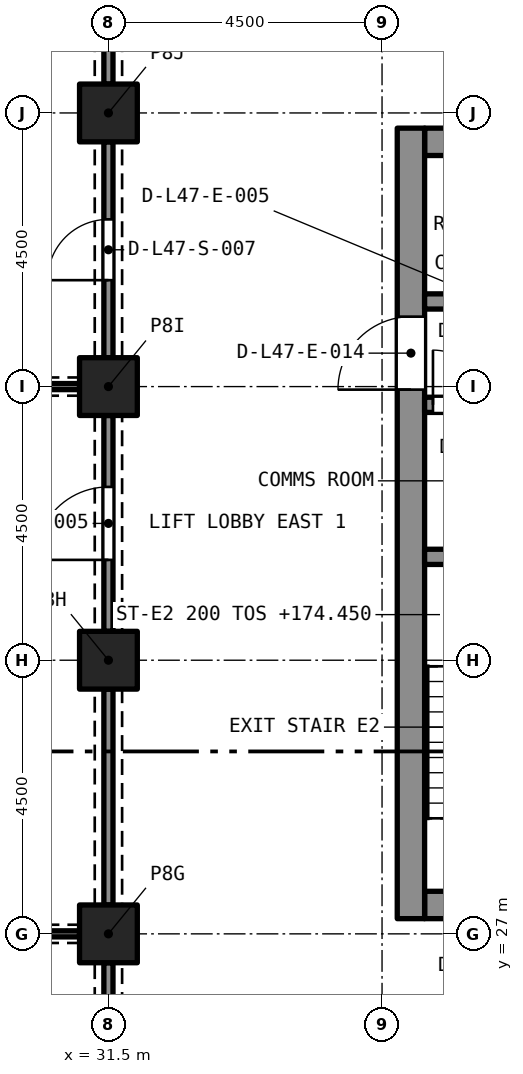
"""IFC4 building model, lengths in metres.
Left out: names, types, materials, properties, quantities, classifications, styles, units other than length and angle.
Written with IfcOpenShell. Run it as: python <this file> out.ifc"""

import sys

from ifc_helpers import new_model, si_unit, direction, frame, frame_2d, origin, origin_2d, place, context, subcontext, project, spatial, rectangle, extrude, element, fill, save


model = new_model("IFC4")
c1 = context("Model", 3, precision=1e-05, world=origin(), true_north=direction((0.0, 1.0)))
c2 = subcontext(c1, "Body", "Model", "MODEL_VIEW")
j1 = project(units=[si_unit("LENGTHUNIT", "METRE"), si_unit("PLANEANGLEUNIT", "RADIAN")], contexts=[c1])
p1 = place(None, origin())
s1 = spatial("IfcSite", under=j1, at=p1, CompositionType="ELEMENT")
p2 = place(p1, origin())
s2 = spatial("IfcBuilding", under=s1, at=p2, CompositionType="ELEMENT")
p3 = place(p2, frame((0.0, 0.0, 172.6)))
s3 = spatial("IfcBuildingStorey", under=s2, at=p3, CompositionType="ELEMENT", Elevation=172.6)
for number, where, z_axis, x_axis in (
    (1, (31.5, 27.0, 0.0), (0.0, 0.0, 1.0), (1.0, 0.0, 0.0)),
    (2, (31.5, 31.5, 0.0), (0.0, 0.0, 1.0), (1.0, 0.0, 0.0)),
    (3, (31.5, 36.0, 0.0), (0.0, 0.0, 1.0), (1.0, 0.0, 0.0)),
    (4, (31.5, 40.5, 0.0), (0.0, 0.0, 1.0), (1.0, 0.0, 0.0)),
):
    element("IfcColumn", number, at=place(p3, frame(where, z_axis=z_axis, x_axis=x_axis)), inside=s3, PredefinedType="COLUMN", context=c2, shape_type="SweptSolid", body=[
        extrude(rectangle(XDim=0.95, YDim=0.95, at=origin_2d()), origin(), (0.0, 0.0, 1.0), 3.7),
    ])
p4 = place(p3, frame((36.7, 27.475, 0.0), z_axis=(0.0, 0.0, 1.0), x_axis=(1.0, 0.0, 0.0)))
e5 = element("IfcWall", 5, at=p4, inside=s3, PredefinedType="SOLIDWALL", context=c2, shape_type="SweptSolid", body=[
    extrude(rectangle(XDim=7.6, YDim=0.45, at=frame_2d((3.8, 0.0))), origin(), (0.0, 0.0, 1.0), 3.7),
])
p5 = place(p4, frame((5.775, 0.0, 0.0)))
e6 = element("IfcOpeningElement", 6, at=p5, cuts=e5, PredefinedType="OPENING", context=c2, shape_type="SweptSolid", body=[
    extrude(rectangle(XDim=1.1, YDim=2.1, at=frame_2d((0.55, 1.05))), frame((0.0, 0.235, 0.0), z_axis=(0.0, -1.0, 0.0), x_axis=(1.0, 0.0, 0.0)), (0.0, 0.0, 1.0), 0.47),
])
p6 = place(p4, frame((3.25, 0.0, 0.0)))
e7 = element("IfcOpeningElement", 7, at=p6, cuts=e5, PredefinedType="OPENING", context=c2, shape_type="SweptSolid", body=[
    extrude(rectangle(XDim=1.1, YDim=2.1, at=frame_2d((0.55, 1.05))), frame((0.0, 0.235, 0.0), z_axis=(0.0, -1.0, 0.0), x_axis=(1.0, 0.0, 0.0)), (0.0, 0.0, 1.0), 0.47),
])
p7 = place(p4, frame((0.725, 0.0, 0.0)))
e8 = element("IfcOpeningElement", 8, at=p7, cuts=e5, PredefinedType="OPENING", context=c2, shape_type="SweptSolid", body=[
    extrude(rectangle(XDim=1.1, YDim=2.1, at=frame_2d((0.55, 1.05))), frame((0.0, 0.235, 0.0), z_axis=(0.0, -1.0, 0.0), x_axis=(1.0, 0.0, 0.0)), (0.0, 0.0, 1.0), 0.47),
])
p8 = place(p3, frame((36.7, 40.025, 0.0), z_axis=(0.0, 0.0, 1.0), x_axis=(1.0, 0.0, 0.0)))
e9 = element("IfcWall", 9, at=p8, inside=s3, PredefinedType="SOLIDWALL", context=c2, shape_type="SweptSolid", body=[
    extrude(rectangle(XDim=7.6, YDim=0.45, at=frame_2d((3.8, 0.0))), origin(), (0.0, 0.0, 1.0), 3.7),
])
p9 = place(p3, frame((36.475, 27.25, 0.0), z_axis=(0.0, 0.0, 1.0), x_axis=(0.0, 1.0, 0.0)))
e10 = element("IfcWall", 10, at=p9, inside=s3, PredefinedType="SOLIDWALL", context=c2, shape_type="SweptSolid", body=[
    extrude(rectangle(XDim=13.0, YDim=0.45, at=frame_2d((6.5, 0.0))), origin(), (0.0, 0.0, 1.0), 3.7),
])
p10 = place(p9, frame((8.7, 0.0, 0.0)))
e11 = element("IfcOpeningElement", 11, at=p10, cuts=e10, PredefinedType="OPENING", context=c2, shape_type="SweptSolid", body=[
    extrude(rectangle(XDim=1.2, YDim=2.1, at=frame_2d((0.6, 1.05))), frame((0.0, 0.235, 0.0), z_axis=(0.0, -1.0, 0.0), x_axis=(1.0, 0.0, 0.0)), (0.0, 0.0, 1.0), 0.47),
])
p11 = place(p3, frame((36.7, 33.2, 0.0), z_axis=(0.0, 0.0, 1.0), x_axis=(1.0, 0.0, 0.0)))
e12 = element("IfcWall", 12, at=p11, inside=s3, PredefinedType="SOLIDWALL", context=c2, shape_type="SweptSolid", body=[
    extrude(rectangle(XDim=7.6, YDim=0.25, at=frame_2d((3.8, 0.0))), origin(), (0.0, 0.0, 1.0), 3.4),
])
p12 = place(p11, frame((3.3, 0.0, 0.0)))
e13 = element("IfcOpeningElement", 13, at=p12, cuts=e12, PredefinedType="OPENING", context=c2, shape_type="SweptSolid", body=[
    extrude(rectangle(XDim=1.0, YDim=2.1, at=frame_2d((0.5, 1.05))), frame((0.0, 0.135, 0.0), z_axis=(0.0, -1.0, 0.0), x_axis=(1.0, 0.0, 0.0)), (0.0, 0.0, 1.0), 0.27),
])
p13 = place(p3, frame((36.7, 35.7, 0.0), z_axis=(0.0, 0.0, 1.0), x_axis=(1.0, 0.0, 0.0)))
e14 = element("IfcWall", 14, at=p13, inside=s3, PredefinedType="SOLIDWALL", context=c2, shape_type="SweptSolid", body=[
    extrude(rectangle(XDim=7.6, YDim=0.25, at=frame_2d((3.8, 0.0))), origin(), (0.0, 0.0, 1.0), 3.4),
])
p14 = place(p13, frame((5.775, 0.0, 0.0)))
e15 = element("IfcOpeningElement", 15, at=p14, cuts=e14, PredefinedType="OPENING", context=c2, shape_type="SweptSolid", body=[
    extrude(rectangle(XDim=1.1, YDim=2.4, at=frame_2d((0.55, 1.2))), frame((0.0, 0.135, 0.0), z_axis=(0.0, -1.0, 0.0), x_axis=(1.0, 0.0, 0.0)), (0.0, 0.0, 1.0), 0.27),
])
p15 = place(p13, frame((1.512, 0.0, 0.0)))
e16 = element("IfcOpeningElement", 16, at=p15, cuts=e14, PredefinedType="OPENING", context=c2, shape_type="SweptSolid", body=[
    extrude(rectangle(XDim=0.9, YDim=2.1, at=frame_2d((0.45, 1.05))), frame((0.0, 0.135, 0.0), z_axis=(0.0, -1.0, 0.0), x_axis=(1.0, 0.0, 0.0)), (0.0, 0.0, 1.0), 0.27),
])
p16 = place(p13, frame((0.137, 0.0, 0.0)))
e17 = element("IfcOpeningElement", 17, at=p16, cuts=e14, PredefinedType="OPENING", context=c2, shape_type="SweptSolid", body=[
    extrude(rectangle(XDim=0.9, YDim=2.1, at=frame_2d((0.45, 1.05))), frame((0.0, 0.135, 0.0), z_axis=(0.0, -1.0, 0.0), x_axis=(1.0, 0.0, 0.0)), (0.0, 0.0, 1.0), 0.27),
])
p17 = place(p3, frame((36.7, 37.4, 0.0), z_axis=(0.0, 0.0, 1.0), x_axis=(1.0, 0.0, 0.0)))
e18 = element("IfcWall", 18, at=p17, inside=s3, PredefinedType="SOLIDWALL", context=c2, shape_type="SweptSolid", body=[
    extrude(rectangle(XDim=7.6, YDim=0.25, at=frame_2d((3.8, 0.0))), origin(), (0.0, 0.0, 1.0), 3.4),
])
p18 = place(p17, frame((0.75, 0.0, 0.0)))
e19 = element("IfcOpeningElement", 19, at=p18, cuts=e18, PredefinedType="OPENING", context=c2, shape_type="SweptSolid", body=[
    extrude(rectangle(XDim=0.7, YDim=2.1, at=frame_2d((0.35, 1.05))), frame((0.0, 0.135, 0.0), z_axis=(0.0, -1.0, 0.0), x_axis=(1.0, 0.0, 0.0)), (0.0, 0.0, 1.0), 0.27),
])
p19 = place(p17, frame((6.575, 0.0, 0.0)))
e20 = element("IfcOpeningElement", 20, at=p19, cuts=e18, PredefinedType="OPENING", context=c2, shape_type="SweptSolid", body=[
    extrude(rectangle(XDim=0.9, YDim=2.1, at=frame_2d((0.45, 1.05))), frame((0.0, 0.135, 0.0), z_axis=(0.0, -1.0, 0.0), x_axis=(1.0, 0.0, 0.0)), (0.0, 0.0, 1.0), 0.27),
])
p20 = place(p17, frame((5.225, 0.0, 0.0)))
e21 = element("IfcOpeningElement", 21, at=p20, cuts=e18, PredefinedType="OPENING", context=c2, shape_type="SweptSolid", body=[
    extrude(rectangle(XDim=0.9, YDim=2.1, at=frame_2d((0.45, 1.05))), frame((0.0, 0.135, 0.0), z_axis=(0.0, -1.0, 0.0), x_axis=(1.0, 0.0, 0.0)), (0.0, 0.0, 1.0), 0.27),
])
p21 = place(p17, frame((3.2, 0.0, 0.0)))
e22 = element("IfcOpeningElement", 22, at=p21, cuts=e18, PredefinedType="OPENING", context=c2, shape_type="SweptSolid", body=[
    extrude(rectangle(XDim=0.9, YDim=2.1, at=frame_2d((0.45, 1.05))), frame((0.0, 0.135, 0.0), z_axis=(0.0, -1.0, 0.0), x_axis=(1.0, 0.0, 0.0)), (0.0, 0.0, 1.0), 0.27),
])
p22 = place(p3, frame((18.475, 27.0, 0.0), z_axis=(0.0, 0.0, 1.0), x_axis=(1.0, 0.0, 0.0)))
e23 = element("IfcWall", 23, at=p22, inside=s3, PredefinedType="PARTITIONING", context=c2, shape_type="SweptSolid", body=[
    extrude(rectangle(XDim=12.55, YDim=0.1, at=frame_2d((6.275, 0.0))), origin(), (0.0, 0.0, 1.0), 3.25),
])
p23 = place(p3, frame((31.5, 22.975, 0.0), z_axis=(0.0, 0.0, 1.0), x_axis=(0.0, 1.0, 0.0)))
e24 = element("IfcWall", 24, at=p23, inside=s3, PredefinedType="PARTITIONING", context=c2, shape_type="SweptSolid", body=[
    extrude(rectangle(XDim=3.55, YDim=0.15, at=frame_2d((1.775, 0.0))), origin(), (0.0, 0.0, 1.0), 2.88),
])
p24 = place(p23, frame((1.275, 0.0, 0.0)))
e25 = element("IfcOpeningElement", 25, at=p24, cuts=e24, PredefinedType="OPENING", context=c2, shape_type="SweptSolid", body=[
    extrude(rectangle(XDim=1.0, YDim=2.1, at=frame_2d((0.5, 1.05))), frame((0.0, 0.085, 0.0), z_axis=(0.0, -1.0, 0.0), x_axis=(1.0, 0.0, 0.0)), (0.0, 0.0, 1.0), 0.17),
])
p25 = place(p3, frame((18.475, 36.0, 0.0), z_axis=(0.0, 0.0, 1.0), x_axis=(1.0, 0.0, 0.0)))
e26 = element("IfcWall", 26, at=p25, inside=s3, PredefinedType="PARTITIONING", context=c2, shape_type="SweptSolid", body=[
    extrude(rectangle(XDim=12.55, YDim=0.1, at=frame_2d((6.275, 0.0))), origin(), (0.0, 0.0, 1.0), 3.25),
])
p26 = place(p3, frame((31.5, 31.975, 0.0), z_axis=(0.0, 0.0, 1.0), x_axis=(0.0, 1.0, 0.0)))
e27 = element("IfcWall", 27, at=p26, inside=s3, PredefinedType="PARTITIONING", context=c2, shape_type="SweptSolid", body=[
    extrude(rectangle(XDim=3.55, YDim=0.15, at=frame_2d((1.775, 0.0))), origin(), (0.0, 0.0, 1.0), 2.88),
])
p27 = place(p26, frame((1.175, 0.0, 0.0)))
e28 = element("IfcOpeningElement", 28, at=p27, cuts=e27, PredefinedType="OPENING", context=c2, shape_type="SweptSolid", body=[
    extrude(rectangle(XDim=1.2, YDim=2.1, at=frame_2d((0.6, 1.05))), frame((0.0, 0.085, 0.0), z_axis=(0.0, -1.0, 0.0), x_axis=(1.0, 0.0, 0.0)), (0.0, 0.0, 1.0), 0.17),
])
p28 = place(p3, frame((31.5, 27.475, 0.0), z_axis=(0.0, 0.0, 1.0), x_axis=(0.0, 1.0, 0.0)))
e29 = element("IfcWall", 29, at=p28, inside=s3, PredefinedType="PARTITIONING", context=c2, shape_type="SweptSolid", body=[
    extrude(rectangle(XDim=3.55, YDim=0.15, at=frame_2d((1.775, 0.0))), origin(), (0.0, 0.0, 1.0), 2.88),
])
p29 = place(p3, frame((31.5, 36.475, 0.0), z_axis=(0.0, 0.0, 1.0), x_axis=(0.0, 1.0, 0.0)))
e30 = element("IfcWall", 30, at=p29, inside=s3, PredefinedType="PARTITIONING", context=c2, shape_type="SweptSolid", body=[
    extrude(rectangle(XDim=3.55, YDim=0.15, at=frame_2d((1.775, 0.0))), origin(), (0.0, 0.0, 1.0), 2.88),
])
p30 = place(p29, frame((1.275, 0.0, 0.0)))
e31 = element("IfcOpeningElement", 31, at=p30, cuts=e30, PredefinedType="OPENING", context=c2, shape_type="SweptSolid", body=[
    extrude(rectangle(XDim=1.0, YDim=2.1, at=frame_2d((0.5, 1.05))), frame((0.0, 0.085, 0.0), z_axis=(0.0, -1.0, 0.0), x_axis=(1.0, 0.0, 0.0)), (0.0, 0.0, 1.0), 0.17),
])
p31 = place(p3, frame((31.5, 40.975, 0.0), z_axis=(0.0, 0.0, 1.0), x_axis=(0.0, 1.0, 0.0)))
e32 = element("IfcWall", 32, at=p31, inside=s3, PredefinedType="PARTITIONING", context=c2, shape_type="SweptSolid", body=[
    extrude(rectangle(XDim=3.55, YDim=0.15, at=frame_2d((1.775, 0.0))), origin(), (0.0, 0.0, 1.0), 2.88),
])
p32 = place(p16, origin())
e33 = element("IfcDoor", 33, at=p32, inside=s3, OperationType="SINGLE_SWING_LEFT", PredefinedType="DOOR", context=c2, shape_type="SweptSolid", body=[
    extrude(rectangle(XDim=0.9, YDim=2.1, at=frame_2d((0.45, 1.05))), frame((0.0, 0.025, 0.0), z_axis=(0.0, -1.0, 0.0), x_axis=(1.0, 0.0, 0.0)), (0.0, 0.0, 1.0), 0.05),
])
fill(e17, e33)
p33 = place(p10, origin())
e34 = element("IfcDoor", 34, at=p33, inside=s3, OperationType="SINGLE_SWING_LEFT", PredefinedType="DOOR", context=c2, shape_type="SweptSolid", body=[
    extrude(rectangle(XDim=1.2, YDim=2.1, at=frame_2d((0.6, 1.05))), frame((0.0, 0.025, 0.0), z_axis=(0.0, -1.0, 0.0), x_axis=(1.0, 0.0, 0.0)), (0.0, 0.0, 1.0), 0.05),
])
fill(e11, e34)
p34 = place(p27, origin())
e35 = element("IfcDoor", 35, at=p34, inside=s3, OperationType="SINGLE_SWING_LEFT", PredefinedType="DOOR", context=c2, shape_type="SweptSolid", body=[
    extrude(rectangle(XDim=1.2, YDim=2.1, at=frame_2d((0.6, 1.05))), frame((0.0, 0.025, 0.0), z_axis=(0.0, -1.0, 0.0), x_axis=(1.0, 0.0, 0.0)), (0.0, 0.0, 1.0), 0.05),
])
fill(e28, e35)
p35 = place(p30, origin())
e36 = element("IfcDoor", 36, at=p35, inside=s3, OperationType="SINGLE_SWING_RIGHT", PredefinedType="DOOR", context=c2, shape_type="SweptSolid", body=[
    extrude(rectangle(XDim=1.0, YDim=2.1, at=frame_2d((0.5, 1.05))), frame((0.0, 0.025, 0.0), z_axis=(0.0, -1.0, 0.0), x_axis=(1.0, 0.0, 0.0)), (0.0, 0.0, 1.0), 0.05),
])
fill(e31, e36)
save(model, sys.argv[1])
